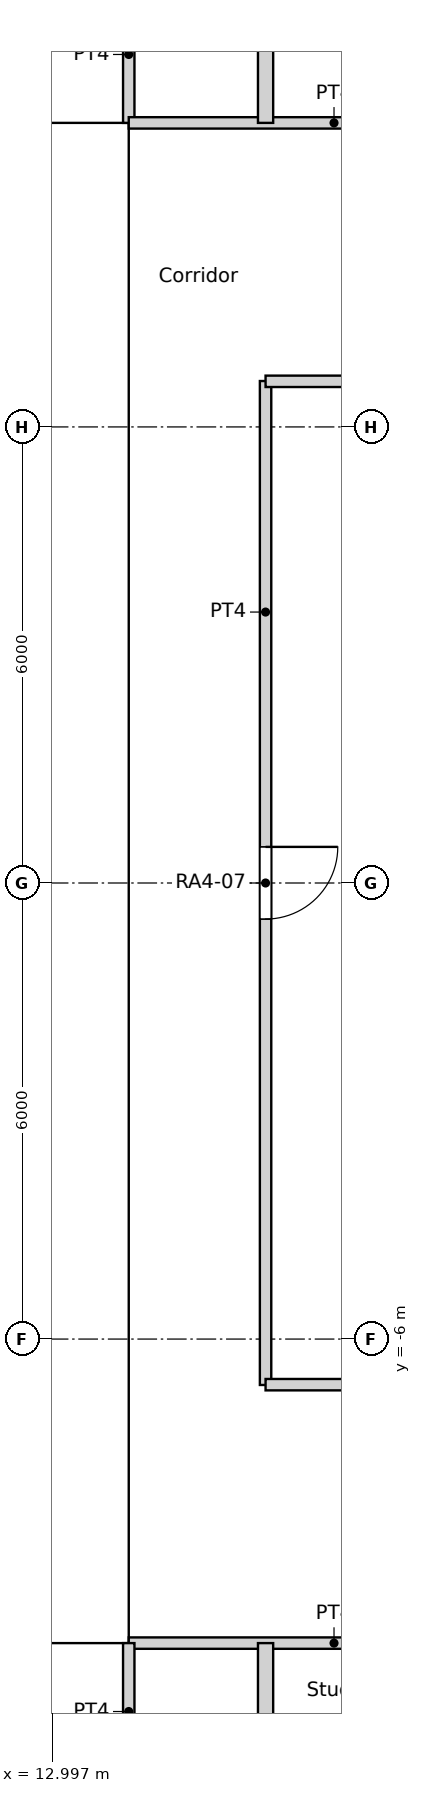
"""IFC4 building model, lengths in metres.
Left out: names, types, materials, properties, quantities, classifications, styles, units other than length and angle.
Written with IfcOpenShell. Run it as: python <this file> out.ifc"""

import sys

from ifc_helpers import new_model, si_unit, direction, frame, frame_2d, origin, origin_2d, place, context, subcontext, project, spatial, rectangle, circle, extrude, element, fill, save


model = new_model("IFC4")
c1 = context("Model", 3, precision=1e-05, world=origin(), true_north=direction((0.0, 1.0)))
c2 = subcontext(c1, "Body", "Model", "MODEL_VIEW")
j1 = project(units=[si_unit("LENGTHUNIT", "METRE"), si_unit("PLANEANGLEUNIT", "RADIAN")], contexts=[c1])
p1 = place(None, origin())
s1 = spatial("IfcSite", under=j1, at=p1, CompositionType="ELEMENT")
p2 = place(p1, origin())
s2 = spatial("IfcBuilding", under=s1, at=p2, CompositionType="ELEMENT")
p3 = place(p2, frame((0.0, 0.0, 60.6)))
s3 = spatial("IfcBuildingStorey", under=s2, at=p3, CompositionType="ELEMENT", Elevation=60.6)
for number, where, z_axis, x_axis in (
    (1, (15.552, 10.603, 0.0), (0.0, 0.0, 1.0), (1.0, 0.0, 0.0)),
    (2, (15.552, -10.603, 0.0), (0.0, 0.0, 1.0), (1.0, 0.0, 0.0)),
):
    element("IfcColumn", number, at=place(p3, frame(where, z_axis=z_axis, x_axis=x_axis)), inside=s3, PredefinedType="COLUMN", context=c2, shape_type="SweptSolid", body=[
        extrude(circle(Radius=0.8, at=origin_2d()), origin(), (0.0, 0.0, 1.0), 3.6),
    ])
p4 = place(p3, frame((-14.0, -9.4, 0.0), z_axis=(0.0, 0.0, 1.0), x_axis=(1.0, 0.0, 0.0)))
e3 = element("IfcWall", 3, at=p4, inside=s3, PredefinedType="SOLIDWALL", context=c2, shape_type="SweptSolid", body=[
    extrude(rectangle(XDim=28.0, YDim=1.2, at=frame_2d((14.0, 0.0))), origin(), (0.0, 0.0, 1.0), 3.6),
])
p5 = place(p4, frame((14.9, 0.0, 0.0)))
e4 = element("IfcOpeningElement", 4, at=p5, cuts=e3, PredefinedType="OPENING", context=c2, shape_type="SweptSolid", body=[
    extrude(rectangle(XDim=1.0, YDim=2.1, at=frame_2d((0.5, 1.05))), frame((0.0, 0.6, 0.0), z_axis=(0.0, -1.0, 0.0), x_axis=(1.0, 0.0, 0.0)), (0.0, 0.0, 1.0), 1.2),
])
p6 = place(p4, frame((9.8, 0.0, 0.0)))
e5 = element("IfcOpeningElement", 5, at=p6, cuts=e3, PredefinedType="OPENING", context=c2, shape_type="SweptSolid", body=[
    extrude(rectangle(XDim=1.8, YDim=2.1, at=frame_2d((0.9, 1.05))), frame((0.0, 0.6, 0.0), z_axis=(0.0, -1.0, 0.0), x_axis=(1.0, 0.0, 0.0)), (0.0, 0.0, 1.0), 1.2),
])
p7 = place(p4, frame((16.4, 0.0, 0.0)))
e6 = element("IfcOpeningElement", 6, at=p7, cuts=e3, PredefinedType="OPENING", context=c2, shape_type="SweptSolid", body=[
    extrude(rectangle(XDim=1.8, YDim=2.1, at=frame_2d((0.9, 1.05))), frame((0.0, 0.6, 0.0), z_axis=(0.0, -1.0, 0.0), x_axis=(1.0, 0.0, 0.0)), (0.0, 0.0, 1.0), 1.2),
])
p8 = place(p3, frame((-14.0, 9.4, 0.0), z_axis=(0.0, 0.0, 1.0), x_axis=(1.0, 0.0, 0.0)))
e7 = element("IfcWall", 7, at=p8, inside=s3, PredefinedType="SOLIDWALL", context=c2, shape_type="SweptSolid", body=[
    extrude(rectangle(XDim=28.0, YDim=1.2, at=frame_2d((14.0, 0.0))), origin(), (0.0, 0.0, 1.0), 3.6),
])
p9 = place(p8, frame((9.8, 0.0, 0.0)))
e8 = element("IfcOpeningElement", 8, at=p9, cuts=e7, PredefinedType="OPENING", context=c2, shape_type="SweptSolid", body=[
    extrude(rectangle(XDim=1.8, YDim=2.1, at=frame_2d((0.9, 1.05))), frame((0.0, 0.6, 0.0), z_axis=(0.0, -1.0, 0.0), x_axis=(1.0, 0.0, 0.0)), (0.0, 0.0, 1.0), 1.2),
])
p10 = place(p3, frame((13.4, -8.8, 0.0), z_axis=(0.0, 0.0, 1.0), x_axis=(0.0, 1.0, 0.0)))
e9 = element("IfcWall", 9, at=p10, inside=s3, PredefinedType="SOLIDWALL", context=c2, shape_type="SweptSolid", body=[
    extrude(rectangle(XDim=17.6, YDim=1.2, at=frame_2d((8.8, 0.0))), origin(), (0.0, 0.0, 1.0), 3.6),
])
p11 = place(p10, frame((6.3, 0.0, 0.0)))
e10 = element("IfcOpeningElement", 10, at=p11, cuts=e9, PredefinedType="OPENING", context=c2, shape_type="SweptSolid", body=[
    extrude(rectangle(XDim=1.0, YDim=2.1, at=frame_2d((0.5, 1.05))), frame((0.0, 0.6, 0.0), z_axis=(0.0, -1.0, 0.0), x_axis=(1.0, 0.0, 0.0)), (0.0, 0.0, 1.0), 1.2),
])
for number, where, z_axis, x_axis in (
    (11, (14.0, 10.0, 0.0), (0.0, 0.0, 1.0), (0.0, 1.0, 0.0)),
    (12, (14.0, -11.8, 0.0), (0.0, 0.0, 1.0), (0.0, 1.0, 0.0)),
):
    element("IfcWall", number, at=place(p3, frame(where, z_axis=z_axis, x_axis=x_axis)), inside=s3, PredefinedType="PARTITIONING", context=c2, shape_type="SweptSolid", body=[
        extrude(rectangle(XDim=1.8, YDim=0.15, at=frame_2d((0.9, 0.0))), origin(), (0.0, 0.0, 1.0), 3.15),
    ])
for number, where, z_axis, x_axis in (
    (13, (14.0, 10.0, 0.0), (0.0, 0.0, 1.0), (1.0, 0.0, 0.0)),
    (14, (14.0, -10.0, 0.0), (0.0, 0.0, 1.0), (1.0, 0.0, 0.0)),
):
    element("IfcWall", number, at=place(p3, frame(where, z_axis=z_axis, x_axis=x_axis)), inside=s3, PredefinedType="PARTITIONING", context=c2, shape_type="SweptSolid", body=[
        extrude(rectangle(XDim=5.401, YDim=0.15, at=frame_2d((2.7, 0.0))), origin(), (0.0, 0.0, 1.0), 3.15),
    ])
p12 = place(p3, frame((15.8, -6.604, 0.0), z_axis=(0.0, 0.0, 1.0), x_axis=(0.0, 1.0, 0.0)))
e15 = element("IfcWall", 15, at=p12, inside=s3, PredefinedType="PARTITIONING", context=c2, shape_type="SweptSolid", body=[
    extrude(rectangle(XDim=13.208, YDim=0.15, at=frame_2d((6.604, 0.0))), origin(), (0.0, 0.0, 1.0), 3.15),
])
p13 = place(p12, frame((6.129, 0.0, 0.0)))
e16 = element("IfcOpeningElement", 16, at=p13, cuts=e15, PredefinedType="OPENING", context=c2, shape_type="SweptSolid", body=[
    extrude(rectangle(XDim=0.95, YDim=2.1, at=frame_2d((0.475, 1.05))), frame((0.0, 0.075, 0.0), z_axis=(0.0, -1.0, 0.0), x_axis=(1.0, 0.0, 0.0)), (0.0, 0.0, 1.0), 0.15),
])
for number, where, z_axis, x_axis in (
    (17, (15.8, -6.6, 0.0), (0.0, 0.0, 1.0), (1.0, 0.0, 0.0)),
    (18, (15.8, 6.6, 0.0), (0.0, 0.0, 1.0), (1.0, 0.0, 0.0)),
):
    element("IfcWall", number, at=place(p3, frame(where, z_axis=z_axis, x_axis=x_axis)), inside=s3, PredefinedType="PARTITIONING", context=c2, shape_type="SweptSolid", body=[
        extrude(rectangle(XDim=5.564, YDim=0.15, at=frame_2d((2.782, 0.0))), origin(), (0.0, 0.0, 1.0), 3.15),
    ])
p14 = place(p3, frame((15.96, 15.96, 0.0), z_axis=(0.0, 0.0, 1.0), x_axis=(0.499992689227, -0.86602962462, 0.0)))
e19 = element("IfcWall", 19, at=p14, inside=s3, PredefinedType="PARTITIONING", context=c2, shape_type="SweptSolid", body=[
    extrude(rectangle(XDim=6.882, YDim=0.15, at=frame_2d((3.441, 0.0))), origin(), (0.0, 0.0, 1.0), 3.15),
])
p15 = place(p14, frame((2.941, 0.0, 0.0)))
e20 = element("IfcOpeningElement", 20, at=p15, cuts=e19, PredefinedType="OPENING", context=c2, shape_type="SweptSolid", body=[
    extrude(rectangle(XDim=1.0, YDim=2.04, at=frame_2d((0.5, 1.02))), frame((0.0, 0.075, 0.0), z_axis=(0.0, -1.0, 0.0), x_axis=(1.0, 0.0, 0.0)), (0.0, 0.0, 1.0), 0.15),
])
p16 = place(p3, frame((15.96, -15.96, 0.0), z_axis=(0.0, 0.0, 1.0), x_axis=(0.499992689227, 0.86602962462, 0.0)))
e21 = element("IfcWall", 21, at=p16, inside=s3, PredefinedType="PARTITIONING", context=c2, shape_type="SweptSolid", body=[
    extrude(rectangle(XDim=6.882, YDim=0.15, at=frame_2d((3.441, 0.0))), origin(), (0.0, 0.0, 1.0), 3.15),
])
p17 = place(p16, frame((2.941, 0.0, 0.0)))
e22 = element("IfcOpeningElement", 22, at=p17, cuts=e21, PredefinedType="OPENING", context=c2, shape_type="SweptSolid", body=[
    extrude(rectangle(XDim=1.0, YDim=2.04, at=frame_2d((0.5, 1.02))), frame((0.0, 0.075, 0.0), z_axis=(0.0, -1.0, 0.0), x_axis=(1.0, 0.0, 0.0)), (0.0, 0.0, 1.0), 0.15),
])
for number, where, z_axis, x_axis in (
    (23, (15.8, 10.0, 0.0), (0.0, 0.0, 1.0), (0.0, 1.0, 0.0)),
    (24, (15.8, -16.053, 0.0), (0.0, 0.0, 1.0), (0.0, 1.0, 0.0)),
):
    element("IfcWall", number, at=place(p3, frame(where, z_axis=z_axis, x_axis=x_axis)), inside=s3, PredefinedType="PARTITIONING", context=c2, shape_type="SweptSolid", body=[
        extrude(rectangle(XDim=6.053, YDim=0.2, at=frame_2d((3.026, 0.0))), origin(), (0.0, 0.0, 1.0), 3.15),
    ])
p18 = place(p11, origin())
e25 = element("IfcDoor", 25, at=p18, inside=s3, OperationType="DOUBLE_DOOR_SINGLE_SWING", PredefinedType="DOOR", context=c2, shape_type="SweptSolid", body=[
    extrude(rectangle(XDim=1.0, YDim=2.1, at=frame_2d((0.5, 1.05))), frame((0.0, 0.025, 0.0), z_axis=(0.0, -1.0, 0.0), x_axis=(1.0, 0.0, 0.0)), (0.0, 0.0, 1.0), 0.05),
])
fill(e10, e25)
p19 = place(p13, origin())
e26 = element("IfcDoor", 26, at=p19, inside=s3, OperationType="SINGLE_SWING_LEFT", PredefinedType="DOOR", context=c2, shape_type="SweptSolid", body=[
    extrude(rectangle(XDim=0.95, YDim=2.1, at=frame_2d((0.475, 1.05))), frame((0.0, 0.025, 0.0), z_axis=(0.0, -1.0, 0.0), x_axis=(1.0, 0.0, 0.0)), (0.0, 0.0, 1.0), 0.05),
])
fill(e16, e26)
save(model, sys.argv[1])
